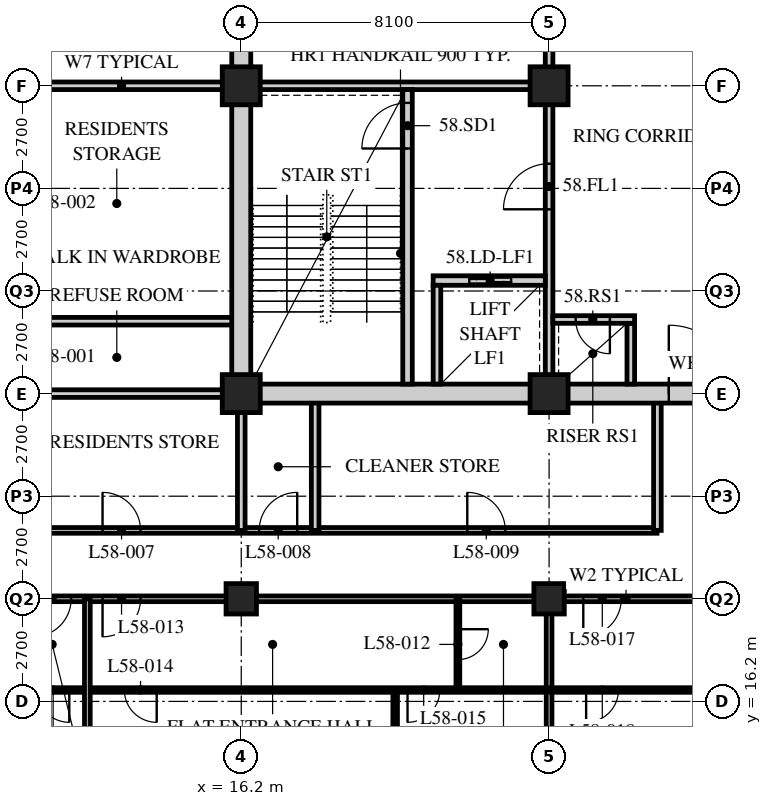
"""IFC4 building model, lengths in metres.
Left out: names, types, materials, properties, quantities, classifications, styles, units other than length and angle.
Written with IfcOpenShell. Run it as: python <this file> out.ifc"""

import sys

from ifc_helpers import new_model, si_unit, direction, frame, frame_2d, origin, origin_2d, place, context, subcontext, project, spatial, rectangle, hollow_rectangle, extrude, element, fill, save


model = new_model("IFC4")
c1 = context("Model", 3, precision=1e-05, world=origin(), true_north=direction((0.0, 1.0)))
c2 = subcontext(c1, "Body", "Model", "MODEL_VIEW")
j1 = project(units=[si_unit("LENGTHUNIT", "METRE"), si_unit("PLANEANGLEUNIT", "RADIAN")], contexts=[c1])
p1 = place(None, origin())
s1 = spatial("IfcSite", under=j1, at=p1, CompositionType="ELEMENT")
p2 = place(p1, origin())
s2 = spatial("IfcBuilding", under=s1, at=p2, CompositionType="ELEMENT")
p3 = place(p2, frame((0.0, 0.0, 224.4)))
s3 = spatial("IfcBuildingStorey", under=s2, at=p3, CompositionType="ELEMENT", Elevation=224.4)
p4 = place(p3, frame((16.2, 18.9, 0.0), z_axis=(0.0, 0.0, 1.0), x_axis=(1.0, 0.0, 0.0)))
e1 = element("IfcColumn", 1, at=p4, inside=s3, PredefinedType="COLUMN", context=c2, shape_type="SweptSolid", body=[
    extrude(hollow_rectangle(XDim=0.8, YDim=0.8, WallThickness=0.08, at=origin_2d()), origin(), (0.0, 0.0, 1.0), 3.6),
])
for number, where, z_axis, x_axis in (
    (2, (16.2, 24.3, 0.0), (0.0, 0.0, 1.0), (1.0, 0.0, 0.0)),
    (3, (16.2, 32.4, 0.0), (0.0, 0.0, 1.0), (1.0, 0.0, 0.0)),
):
    element("IfcColumn", number, at=place(p3, frame(where, z_axis=z_axis, x_axis=x_axis)), inside=s3, PredefinedType="COLUMN", context=c2, shape_type="SweptSolid", body=[
        extrude(hollow_rectangle(XDim=1.0, YDim=1.0, WallThickness=0.1, at=origin_2d()), origin(), (0.0, 0.0, 1.0), 3.6),
    ])
p5 = place(p3, frame((24.3, 18.9, 0.0), z_axis=(0.0, 0.0, 1.0), x_axis=(1.0, 0.0, 0.0)))
e4 = element("IfcColumn", 4, at=p5, inside=s3, PredefinedType="COLUMN", context=c2, shape_type="SweptSolid", body=[
    extrude(hollow_rectangle(XDim=0.8, YDim=0.8, WallThickness=0.08, at=origin_2d()), origin(), (0.0, 0.0, 1.0), 3.6),
])
for number, where, z_axis, x_axis in (
    (5, (24.3, 24.3, 0.0), (0.0, 0.0, 1.0), (1.0, 0.0, 0.0)),
    (6, (24.3, 32.4, 0.0), (0.0, 0.0, 1.0), (1.0, 0.0, 0.0)),
):
    element("IfcColumn", number, at=place(p3, frame(where, z_axis=z_axis, x_axis=x_axis)), inside=s3, PredefinedType="COLUMN", context=c2, shape_type="SweptSolid", body=[
        extrude(hollow_rectangle(XDim=1.0, YDim=1.0, WallThickness=0.1, at=origin_2d()), origin(), (0.0, 0.0, 1.0), 3.6),
    ])
p6 = place(p3, frame((8.1, 18.9, 0.0), z_axis=(0.0, 0.0, 1.0), x_axis=(1.0, 0.0, 0.0)))
e7 = element("IfcWall", 7, at=p6, inside=s3, PredefinedType="PARTITIONING", context=c2, shape_type="SweptSolid", body=[
    extrude(rectangle(XDim=36.45, YDim=0.15, at=frame_2d((18.225, 0.0))), origin(), (0.0, 0.0, 1.0), 2.628),
])
p7 = place(p6, frame((4.45, 0.0, 0.0)))
e8 = element("IfcOpeningElement", 8, at=p7, cuts=e7, PredefinedType="OPENING", context=c2, shape_type="SweptSolid", body=[
    extrude(rectangle(XDim=1.0, YDim=2.1, at=frame_2d((0.5, 1.05))), frame((0.0, 0.085, 0.0), z_axis=(0.0, -1.0, 0.0), x_axis=(1.0, 0.0, 0.0)), (0.0, 0.0, 1.0), 0.17),
])
p8 = place(p6, frame((17.1, 0.0, 0.0)))
e9 = element("IfcOpeningElement", 9, at=p8, cuts=e7, PredefinedType="OPENING", context=c2, shape_type="SweptSolid", body=[
    extrude(rectangle(XDim=1.0, YDim=2.1, at=frame_2d((0.5, 1.05))), frame((0.0, 0.085, 0.0), z_axis=(0.0, -1.0, 0.0), x_axis=(1.0, 0.0, 0.0)), (0.0, 0.0, 1.0), 0.17),
])
p9 = place(p6, frame((29.05, 0.0, 0.0)))
e10 = element("IfcOpeningElement", 10, at=p9, cuts=e7, PredefinedType="OPENING", context=c2, shape_type="SweptSolid", body=[
    extrude(rectangle(XDim=1.0, YDim=2.1, at=frame_2d((0.5, 1.05))), frame((0.0, 0.085, 0.0), z_axis=(0.0, -1.0, 0.0), x_axis=(1.0, 0.0, 0.0)), (0.0, 0.0, 1.0), 0.17),
])
p10 = place(p6, frame((2.625, 0.0, 0.0)))
e11 = element("IfcOpeningElement", 11, at=p10, cuts=e7, PredefinedType="OPENING", context=c2, shape_type="SweptSolid", body=[
    extrude(rectangle(XDim=1.0, YDim=2.1, at=frame_2d((0.5, 1.05))), frame((0.0, 0.085, 0.0), z_axis=(0.0, -1.0, 0.0), x_axis=(1.0, 0.0, 0.0)), (0.0, 0.0, 1.0), 0.17),
])
p11 = place(p6, frame((33.925, 0.0, 0.0)))
e12 = element("IfcOpeningElement", 12, at=p11, cuts=e7, PredefinedType="OPENING", context=c2, shape_type="SweptSolid", body=[
    extrude(rectangle(XDim=1.0, YDim=2.1, at=frame_2d((0.5, 1.05))), frame((0.0, 0.085, 0.0), z_axis=(0.0, -1.0, 0.0), x_axis=(1.0, 0.0, 0.0)), (0.0, 0.0, 1.0), 0.17),
])
p12 = place(p3, frame((9.9, 20.7, 0.0), z_axis=(0.0, 0.0, 1.0), x_axis=(1.0, 0.0, 0.0)))
e13 = element("IfcWall", 13, at=p12, inside=s3, PredefinedType="PARTITIONING", context=c2, shape_type="SweptSolid", body=[
    extrude(rectangle(XDim=17.24, YDim=0.15, at=frame_2d((8.62, 0.0))), origin(), (0.0, 0.0, 1.0), 3.39),
])
p13 = place(p12, frame((2.65, 0.0, 0.0)))
e14 = element("IfcOpeningElement", 14, at=p13, cuts=e13, PredefinedType="OPENING", context=c2, shape_type="SweptSolid", body=[
    extrude(rectangle(XDim=1.0, YDim=2.1, at=frame_2d((0.5, 1.05))), frame((0.0, 0.085, 0.0), z_axis=(0.0, -1.0, 0.0), x_axis=(1.0, 0.0, 0.0)), (0.0, 0.0, 1.0), 0.17),
])
p14 = place(p12, frame((6.772, 0.0, 0.0)))
e15 = element("IfcOpeningElement", 15, at=p14, cuts=e13, PredefinedType="OPENING", context=c2, shape_type="SweptSolid", body=[
    extrude(rectangle(XDim=1.0, YDim=2.1, at=frame_2d((0.5, 1.05))), frame((0.0, 0.085, 0.0), z_axis=(0.0, -1.0, 0.0), x_axis=(1.0, 0.0, 0.0)), (0.0, 0.0, 1.0), 0.17),
])
p15 = place(p12, frame((12.247, 0.0, 0.0)))
e16 = element("IfcOpeningElement", 16, at=p15, cuts=e13, PredefinedType="OPENING", context=c2, shape_type="SweptSolid", body=[
    extrude(rectangle(XDim=1.0, YDim=2.1, at=frame_2d((0.5, 1.05))), frame((0.0, 0.085, 0.0), z_axis=(0.0, -1.0, 0.0), x_axis=(1.0, 0.0, 0.0)), (0.0, 0.0, 1.0), 0.17),
])
for number, where, z_axis, x_axis in (
    (17, (9.9, 32.4, 0.0), (0.0, 0.0, 1.0), (1.0, 0.0, 0.0)),
    (18, (9.9, 26.205, 0.0), (0.0, 0.0, 1.0), (1.0, 0.0, 0.0)),
):
    element("IfcWall", number, at=place(p3, frame(where, z_axis=z_axis, x_axis=x_axis)), inside=s3, PredefinedType="SOLIDWALL", context=c2, shape_type="SweptSolid", body=[
        extrude(rectangle(XDim=6.3, YDim=0.2, at=frame_2d((3.15, 0.0))), origin(), (0.0, 0.0, 1.0), 3.39),
    ])
p16 = place(p3, frame((16.2, 20.7, 0.0), z_axis=(0.0, 0.0, 1.0), x_axis=(0.0, 1.0, 0.0)))
e19 = element("IfcWall", 19, at=p16, inside=s3, PredefinedType="SOLIDWALL", context=c2, shape_type="SweptSolid", body=[
    extrude(rectangle(XDim=3.6, YDim=0.2, at=frame_2d((1.8, 0.0))), origin(), (0.0, 0.0, 1.0), 2.628),
])
for number, where, z_axis, x_axis in (
    (20, (18.144, 20.7, 0.0), (0.0, 0.0, 1.0), (0.0, 1.0, 0.0)),
    (21, (27.15, 20.7, 0.0), (0.0, 0.0, 1.0), (0.0, 1.0, 0.0)),
):
    element("IfcWall", number, at=place(p3, frame(where, z_axis=z_axis, x_axis=x_axis)), inside=s3, PredefinedType="SOLIDWALL", context=c2, shape_type="SweptSolid", body=[
        extrude(rectangle(XDim=3.6, YDim=0.2, at=frame_2d((1.8, 0.0))), origin(), (0.0, 0.0, 1.0), 3.39),
    ])
p17 = place(p3, frame((9.9, 24.3, 0.0), z_axis=(0.0, 0.0, 1.0), x_axis=(1.0, 0.0, 0.0)))
e22 = element("IfcWall", 22, at=p17, inside=s3, PredefinedType="SOLIDWALL", context=c2, shape_type="SweptSolid", body=[
    extrude(rectangle(XDim=6.3, YDim=0.2, at=frame_2d((3.15, 0.0))), origin(), (0.0, 0.0, 1.0), 3.39),
])
p18 = place(p3, frame((21.9, 18.9, 0.0), z_axis=(0.0, 0.0, 1.0), x_axis=(0.0, -1.0, 0.0)))
e23 = element("IfcWall", 23, at=p18, inside=s3, PredefinedType="PARTITIONING", context=c2, shape_type="SweptSolid", body=[
    extrude(rectangle(XDim=2.4, YDim=0.1, at=frame_2d((1.2, 0.0))), origin(), (0.0, 0.0, 1.0), 3.39),
])
p19 = place(p18, frame((0.8, 0.0, 0.0)))
e24 = element("IfcOpeningElement", 24, at=p19, cuts=e23, PredefinedType="OPENING", context=c2, shape_type="SweptSolid", body=[
    extrude(rectangle(XDim=0.8, YDim=2.1, at=frame_2d((0.4, 1.05))), frame((0.0, 0.06, 0.0), z_axis=(0.0, -1.0, 0.0), x_axis=(1.0, 0.0, 0.0)), (0.0, 0.0, 1.0), 0.12),
])
p20 = place(p3, frame((20.25, 16.5, 0.0), z_axis=(0.0, 0.0, 1.0), x_axis=(0.0, -1.0, 0.0)))
e25 = element("IfcWall", 25, at=p20, inside=s3, PredefinedType="PARTITIONING", context=c2, shape_type="SweptSolid", body=[
    extrude(rectangle(XDim=5.4, YDim=0.12, at=frame_2d((2.7, 0.0))), origin(), (0.0, 0.0, 1.0), 3.39),
])
p21 = place(p3, frame((24.3, 18.9, 0.0), z_axis=(0.0, 0.0, 1.0), x_axis=(0.0, -1.0, 0.0)))
e26 = element("IfcWall", 26, at=p21, inside=s3, PredefinedType="PARTITIONING", context=c2, shape_type="SweptSolid", body=[
    extrude(rectangle(XDim=7.8, YDim=0.15, at=frame_2d((3.9, 0.0))), origin(), (0.0, 0.0, 1.0), 2.628),
])
p22 = place(p3, frame((8.1, 16.5, 0.0), z_axis=(0.0, 0.0, 1.0), x_axis=(1.0, 0.0, 0.0)))
e27 = element("IfcWall", 27, at=p22, inside=s3, PredefinedType="PARTITIONING", context=c2, shape_type="SweptSolid", body=[
    extrude(rectangle(XDim=28.35, YDim=0.12, at=frame_2d((14.175, 0.0))), origin(), (0.0, 0.0, 1.0), 3.39),
])
p23 = place(p22, frame((5.025, 0.0, 0.0)))
e28 = element("IfcOpeningElement", 28, at=p23, cuts=e27, PredefinedType="OPENING", context=c2, shape_type="SweptSolid", body=[
    extrude(rectangle(XDim=0.85, YDim=2.1, at=frame_2d((0.425, 1.05))), frame((0.0, 0.07, 0.0), z_axis=(0.0, -1.0, 0.0), x_axis=(1.0, 0.0, 0.0)), (0.0, 0.0, 1.0), 0.14),
])
p24 = place(p22, frame((12.475, 0.0, 0.0)))
e29 = element("IfcOpeningElement", 29, at=p24, cuts=e27, PredefinedType="OPENING", context=c2, shape_type="SweptSolid", body=[
    extrude(rectangle(XDim=0.85, YDim=2.1, at=frame_2d((0.425, 1.05))), frame((0.0, 0.07, 0.0), z_axis=(0.0, -1.0, 0.0), x_axis=(1.0, 0.0, 0.0)), (0.0, 0.0, 1.0), 0.14),
])
p25 = place(p22, frame((17.175, 0.0, 0.0)))
e30 = element("IfcOpeningElement", 30, at=p25, cuts=e27, PredefinedType="OPENING", context=c2, shape_type="SweptSolid", body=[
    extrude(rectangle(XDim=0.85, YDim=2.1, at=frame_2d((0.425, 1.05))), frame((0.0, 0.07, 0.0), z_axis=(0.0, -1.0, 0.0), x_axis=(1.0, 0.0, 0.0)), (0.0, 0.0, 1.0), 0.14),
])
p26 = place(p22, frame((24.625, 0.0, 0.0)))
e31 = element("IfcOpeningElement", 31, at=p26, cuts=e27, PredefinedType="OPENING", context=c2, shape_type="SweptSolid", body=[
    extrude(rectangle(XDim=0.85, YDim=2.1, at=frame_2d((0.425, 1.05))), frame((0.0, 0.07, 0.0), z_axis=(0.0, -1.0, 0.0), x_axis=(1.0, 0.0, 0.0)), (0.0, 0.0, 1.0), 0.14),
])
p27 = place(p22, frame((2.725, 0.0, 0.0)))
e32 = element("IfcOpeningElement", 32, at=p27, cuts=e27, PredefinedType="OPENING", context=c2, shape_type="SweptSolid", body=[
    extrude(rectangle(XDim=0.85, YDim=2.1, at=frame_2d((0.425, 1.05))), frame((0.0, 0.07, 0.0), z_axis=(0.0, -1.0, 0.0), x_axis=(1.0, 0.0, 0.0)), (0.0, 0.0, 1.0), 0.14),
])
p28 = place(p3, frame((12.15, 18.9, 0.0), z_axis=(0.0, 0.0, 1.0), x_axis=(0.0, -1.0, 0.0)))
e33 = element("IfcWall", 33, at=p28, inside=s3, PredefinedType="PARTITIONING", context=c2, shape_type="SweptSolid", body=[
    extrude(rectangle(XDim=7.8, YDim=0.15, at=frame_2d((3.9, 0.0))), origin(), (0.0, 0.0, 1.0), 3.39),
])
p29 = place(p3, frame((15.95, 24.3, 0.0), z_axis=(0.0, 0.0, 1.0), x_axis=(1.0, 0.0, 0.0)))
e34 = element("IfcWall", 34, at=p29, inside=s3, PredefinedType="SOLIDWALL", context=c2, shape_type="SweptSolid", body=[
    extrude(rectangle(XDim=24.8, YDim=0.5, at=frame_2d((12.4, 0.0))), origin(), (0.0, 0.0, 1.0), 2.628),
])
p30 = place(p29, frame((11.5, 0.0, 0.0)))
e35 = element("IfcOpeningElement", 35, at=p30, cuts=e34, PredefinedType="OPENING", context=c2, shape_type="SweptSolid", body=[
    extrude(rectangle(XDim=1.8, YDim=2.4, at=frame_2d((0.9, 1.2))), frame((0.0, 0.26, 0.0), z_axis=(0.0, -1.0, 0.0), x_axis=(1.0, 0.0, 0.0)), (0.0, 0.0, 1.0), 0.52),
])
p31 = place(p3, frame((16.2, 24.55, 0.0), z_axis=(0.0, 0.0, 1.0), x_axis=(0.0, 1.0, 0.0)))
e36 = element("IfcWall", 36, at=p31, inside=s3, PredefinedType="SOLIDWALL", context=c2, shape_type="SweptSolid", body=[
    extrude(rectangle(XDim=15.7, YDim=0.5, at=frame_2d((7.85, 0.0))), origin(), (0.0, 0.0, 1.0), 2.628),
])
p32 = place(p3, frame((16.45, 32.4, 0.0), z_axis=(0.0, 0.0, 1.0), x_axis=(1.0, 0.0, 0.0)))
e37 = element("IfcWall", 37, at=p32, inside=s3, PredefinedType="SOLIDWALL", context=c2, shape_type="SweptSolid", body=[
    extrude(rectangle(XDim=7.95, YDim=0.2, at=frame_2d((3.975, 0.0))), origin(), (0.0, 0.0, 1.0), 2.778),
])
p33 = place(p3, frame((24.3, 24.55, 0.0), z_axis=(0.0, 0.0, 1.0), x_axis=(0.0, 1.0, 0.0)))
e38 = element("IfcWall", 38, at=p33, inside=s3, PredefinedType="SOLIDWALL", context=c2, shape_type="SweptSolid", body=[
    extrude(rectangle(XDim=7.75, YDim=0.2, at=frame_2d((3.875, 0.0))), origin(), (0.0, 0.0, 1.0), 2.778),
])
p34 = place(p33, frame((4.6, 0.0, 0.0)))
e39 = element("IfcOpeningElement", 39, at=p34, cuts=e38, PredefinedType="OPENING", context=c2, shape_type="SweptSolid", body=[
    extrude(rectangle(XDim=1.2, YDim=2.1, at=frame_2d((0.6, 1.05))), frame((0.0, 0.11, 0.0), z_axis=(0.0, -1.0, 0.0), x_axis=(1.0, 0.0, 0.0)), (0.0, 0.0, 1.0), 0.22),
])
p35 = place(p3, frame((20.575, 24.55, 0.0), z_axis=(0.0, 0.0, 1.0), x_axis=(0.0, 1.0, 0.0)))
e40 = element("IfcWall", 40, at=p35, inside=s3, PredefinedType="SOLIDWALL", context=c2, shape_type="SweptSolid", body=[
    extrude(rectangle(XDim=7.75, YDim=0.25, at=frame_2d((3.875, 0.0))), origin(), (0.0, 0.0, 1.0), 3.39),
])
p36 = place(p35, frame((6.2, 0.0, 0.0)))
e41 = element("IfcOpeningElement", 41, at=p36, cuts=e40, PredefinedType="OPENING", context=c2, shape_type="SweptSolid", body=[
    extrude(rectangle(XDim=1.2, YDim=2.1, at=frame_2d((0.6, 1.05))), frame((0.0, 0.135, 0.0), z_axis=(0.0, -1.0, 0.0), x_axis=(1.0, 0.0, 0.0)), (0.0, 0.0, 1.0), 0.27),
])
p37 = place(p3, frame((21.25, 27.275, 0.0), z_axis=(0.0, 0.0, 1.0), x_axis=(1.0, 0.0, 0.0)))
e42 = element("IfcWall", 42, at=p37, inside=s3, PredefinedType="SOLIDWALL", context=c2, shape_type="SweptSolid", body=[
    extrude(rectangle(XDim=2.95, YDim=0.25, at=frame_2d((1.475, 0.0))), origin(), (0.0, 0.0, 1.0), 3.39),
])
p38 = place(p37, frame((0.95, 0.0, 0.0)))
e43 = element("IfcOpeningElement", 43, at=p38, cuts=e42, PredefinedType="OPENING", context=c2, shape_type="SweptSolid", body=[
    extrude(rectangle(XDim=1.1, YDim=2.4, at=frame_2d((0.55, 1.2))), frame((0.0, 0.135, 0.0), z_axis=(0.0, -1.0, 0.0), x_axis=(1.0, 0.0, 0.0)), (0.0, 0.0, 1.0), 0.27),
])
p39 = place(p3, frame((21.35, 24.55, 0.0), z_axis=(0.0, 0.0, 1.0), x_axis=(0.0, 1.0, 0.0)))
e44 = element("IfcWall", 44, at=p39, inside=s3, PredefinedType="SOLIDWALL", context=c2, shape_type="SweptSolid", body=[
    extrude(rectangle(XDim=2.6, YDim=0.2, at=frame_2d((1.3, 0.0))), origin(), (0.0, 0.0, 1.0), 3.39),
])
p40 = place(p3, frame((26.45, 24.55, 0.0), z_axis=(0.0, 0.0, 1.0), x_axis=(0.0, 1.0, 0.0)))
e45 = element("IfcWall", 45, at=p40, inside=s3, PredefinedType="SOLIDWALL", context=c2, shape_type="SweptSolid", body=[
    extrude(rectangle(XDim=1.6, YDim=0.2, at=frame_2d((0.8, 0.0))), origin(), (0.0, 0.0, 1.0), 3.39),
])
p41 = place(p3, frame((24.4, 26.25, 0.0), z_axis=(0.0, 0.0, 1.0), x_axis=(1.0, 0.0, 0.0)))
e46 = element("IfcWall", 46, at=p41, inside=s3, PredefinedType="SOLIDWALL", context=c2, shape_type="SweptSolid", body=[
    extrude(rectangle(XDim=2.15, YDim=0.2, at=frame_2d((1.075, 0.0))), origin(), (0.0, 0.0, 1.0), 3.39),
])
p42 = place(p41, frame((0.6, 0.0, 0.0)))
e47 = element("IfcOpeningElement", 47, at=p42, cuts=e46, PredefinedType="OPENING", context=c2, shape_type="SweptSolid", body=[
    extrude(rectangle(XDim=0.9, YDim=2.1, at=frame_2d((0.45, 1.05))), frame((0.0, 0.11, 0.0), z_axis=(0.0, -1.0, 0.0), x_axis=(1.0, 0.0, 0.0)), (0.0, 0.0, 1.0), 0.22),
])
p43 = place(p3, frame((24.3, 32.5, 0.0), z_axis=(0.0, 0.0, 1.0), x_axis=(0.0, 1.0, 0.0)))
e48 = element("IfcWall", 48, at=p43, inside=s3, PredefinedType="PARTITIONING", context=c2, shape_type="SweptSolid", body=[
    extrude(rectangle(XDim=7.75, YDim=0.2, at=frame_2d((3.875, 0.0))), origin(), (0.0, 0.0, 1.0), 2.778),
])
p44 = place(p43, frame((2.4, 0.0, 0.0)))
e49 = element("IfcOpeningElement", 49, at=p44, cuts=e48, PredefinedType="OPENING", context=c2, shape_type="SweptSolid", body=[
    extrude(rectangle(XDim=0.9, YDim=2.1, at=frame_2d((0.45, 1.05))), frame((0.0, 0.11, 0.0), z_axis=(0.0, -1.0, 0.0), x_axis=(1.0, 0.0, 0.0)), (0.0, 0.0, 1.0), 0.22),
])
p45 = place(p43, frame((6.2, 0.0, 0.0)))
e50 = element("IfcOpeningElement", 50, at=p45, cuts=e48, PredefinedType="OPENING", context=c2, shape_type="SweptSolid", body=[
    extrude(rectangle(XDim=0.9, YDim=2.1, at=frame_2d((0.45, 1.05))), frame((0.0, 0.11, 0.0), z_axis=(0.0, -1.0, 0.0), x_axis=(1.0, 0.0, 0.0)), (0.0, 0.0, 1.0), 0.22),
])
p46 = place(p13, origin())
e51 = element("IfcDoor", 51, at=p46, inside=s3, OperationType="SINGLE_SWING_LEFT", PredefinedType="DOOR", context=c2, shape_type="SweptSolid", body=[
    extrude(rectangle(XDim=1.0, YDim=2.1, at=frame_2d((0.5, 1.05))), frame((0.0, 0.025, 0.0), z_axis=(0.0, -1.0, 0.0), x_axis=(1.0, 0.0, 0.0)), (0.0, 0.0, 1.0), 0.05),
])
fill(e14, e51)
p47 = place(p14, origin())
e52 = element("IfcDoor", 52, at=p47, inside=s3, OperationType="SINGLE_SWING_RIGHT", PredefinedType="DOOR", context=c2, shape_type="SweptSolid", body=[
    extrude(rectangle(XDim=1.0, YDim=2.1, at=frame_2d((0.5, 1.05))), frame((0.0, 0.025, 0.0), z_axis=(0.0, -1.0, 0.0), x_axis=(1.0, 0.0, 0.0)), (0.0, 0.0, 1.0), 0.05),
])
fill(e15, e52)
p48 = place(p15, origin())
e53 = element("IfcDoor", 53, at=p48, inside=s3, OperationType="SINGLE_SWING_LEFT", PredefinedType="DOOR", context=c2, shape_type="SweptSolid", body=[
    extrude(rectangle(XDim=1.0, YDim=2.1, at=frame_2d((0.5, 1.05))), frame((0.0, 0.025, 0.0), z_axis=(0.0, -1.0, 0.0), x_axis=(1.0, 0.0, 0.0)), (0.0, 0.0, 1.0), 0.05),
])
fill(e16, e53)
p49 = place(p19, origin())
e54 = element("IfcDoor", 54, at=p49, inside=s3, OperationType="SINGLE_SWING_LEFT", PredefinedType="DOOR", context=c2, shape_type="SweptSolid", body=[
    extrude(rectangle(XDim=0.8, YDim=2.1, at=frame_2d((0.4, 1.05))), frame((0.0, 0.025, 0.0), z_axis=(0.0, -1.0, 0.0), x_axis=(1.0, 0.0, 0.0)), (0.0, 0.0, 1.0), 0.05),
])
fill(e24, e54)
p50 = place(p7, origin())
e55 = element("IfcDoor", 55, at=p50, inside=s3, OperationType="SINGLE_SWING_RIGHT", PredefinedType="DOOR", context=c2, shape_type="SweptSolid", body=[
    extrude(rectangle(XDim=1.0, YDim=2.1, at=frame_2d((0.5, 1.05))), frame((0.0, 0.025, 0.0), z_axis=(0.0, -1.0, 0.0), x_axis=(1.0, 0.0, 0.0)), (0.0, 0.0, 1.0), 0.05),
])
fill(e8, e55)
p51 = place(p23, origin())
e56 = element("IfcDoor", 56, at=p51, inside=s3, OperationType="SINGLE_SWING_LEFT", PredefinedType="DOOR", context=c2, shape_type="SweptSolid", body=[
    extrude(rectangle(XDim=0.85, YDim=2.1, at=frame_2d((0.425, 1.05))), frame((0.0, 0.025, 0.0), z_axis=(0.0, -1.0, 0.0), x_axis=(1.0, 0.0, 0.0)), (0.0, 0.0, 1.0), 0.05),
])
fill(e28, e56)
p52 = place(p24, origin())
e57 = element("IfcDoor", 57, at=p52, inside=s3, OperationType="SINGLE_SWING_RIGHT", PredefinedType="DOOR", context=c2, shape_type="SweptSolid", body=[
    extrude(rectangle(XDim=0.85, YDim=2.1, at=frame_2d((0.425, 1.05))), frame((0.0, 0.025, 0.0), z_axis=(0.0, -1.0, 0.0), x_axis=(1.0, 0.0, 0.0)), (0.0, 0.0, 1.0), 0.05),
])
fill(e29, e57)
p53 = place(p8, origin())
e58 = element("IfcDoor", 58, at=p53, inside=s3, OperationType="SINGLE_SWING_RIGHT", PredefinedType="DOOR", context=c2, shape_type="SweptSolid", body=[
    extrude(rectangle(XDim=1.0, YDim=2.1, at=frame_2d((0.5, 1.05))), frame((0.0, 0.025, 0.0), z_axis=(0.0, -1.0, 0.0), x_axis=(1.0, 0.0, 0.0)), (0.0, 0.0, 1.0), 0.05),
])
fill(e9, e58)
p54 = place(p25, origin())
e59 = element("IfcDoor", 59, at=p54, inside=s3, OperationType="SINGLE_SWING_RIGHT", PredefinedType="DOOR", context=c2, shape_type="SweptSolid", body=[
    extrude(rectangle(XDim=0.85, YDim=2.1, at=frame_2d((0.425, 1.05))), frame((0.0, 0.025, 0.0), z_axis=(0.0, -1.0, 0.0), x_axis=(1.0, 0.0, 0.0)), (0.0, 0.0, 1.0), 0.05),
])
fill(e30, e59)
p55 = place(p10, origin())
e60 = element("IfcDoor", 60, at=p55, inside=s3, OperationType="SINGLE_SWING_RIGHT", PredefinedType="DOOR", context=c2, shape_type="SweptSolid", body=[
    extrude(rectangle(XDim=1.0, YDim=2.1, at=frame_2d((0.5, 1.05))), frame((0.0, 0.025, 0.0), z_axis=(0.0, -1.0, 0.0), x_axis=(1.0, 0.0, 0.0)), (0.0, 0.0, 1.0), 0.05),
])
fill(e11, e60)
p56 = place(p27, origin())
e61 = element("IfcDoor", 61, at=p56, inside=s3, OperationType="SINGLE_SWING_LEFT", PredefinedType="DOOR", context=c2, shape_type="SweptSolid", body=[
    extrude(rectangle(XDim=0.85, YDim=2.1, at=frame_2d((0.425, 1.05))), frame((0.0, 0.025, 0.0), z_axis=(0.0, -1.0, 0.0), x_axis=(1.0, 0.0, 0.0)), (0.0, 0.0, 1.0), 0.05),
])
fill(e32, e61)
p57 = place(p36, origin())
e62 = element("IfcDoor", 62, at=p57, inside=s3, OperationType="SINGLE_SWING_LEFT", PredefinedType="DOOR", context=c2, shape_type="SweptSolid", body=[
    extrude(rectangle(XDim=1.2, YDim=2.1, at=frame_2d((0.6, 1.05))), frame((0.0, 0.025, 0.0), z_axis=(0.0, -1.0, 0.0), x_axis=(1.0, 0.0, 0.0)), (0.0, 0.0, 1.0), 0.05),
])
fill(e41, e62)
p58 = place(p34, origin())
e63 = element("IfcDoor", 63, at=p58, inside=s3, OperationType="SINGLE_SWING_LEFT", PredefinedType="DOOR", context=c2, shape_type="SweptSolid", body=[
    extrude(rectangle(XDim=1.2, YDim=2.1, at=frame_2d((0.6, 1.05))), frame((0.0, 0.025, 0.0), z_axis=(0.0, -1.0, 0.0), x_axis=(1.0, 0.0, 0.0)), (0.0, 0.0, 1.0), 0.05),
])
fill(e39, e63)
p59 = place(p42, origin())
e64 = element("IfcDoor", 64, at=p59, inside=s3, OperationType="SINGLE_SWING_LEFT", PredefinedType="DOOR", context=c2, shape_type="SweptSolid", body=[
    extrude(rectangle(XDim=0.9, YDim=2.1, at=frame_2d((0.45, 1.05))), frame((0.0, 0.025, 0.0), z_axis=(0.0, -1.0, 0.0), x_axis=(1.0, 0.0, 0.0)), (0.0, 0.0, 1.0), 0.05),
])
fill(e47, e64)
p60 = place(p38, origin())
e65 = element("IfcDoor", 65, at=p60, inside=s3, OperationType="DOUBLE_DOOR_SLIDING", PredefinedType="DOOR", context=c2, shape_type="SweptSolid", body=[
    extrude(rectangle(XDim=1.1, YDim=2.4, at=frame_2d((0.55, 1.2))), frame((0.0, 0.025, 0.0), z_axis=(0.0, -1.0, 0.0), x_axis=(1.0, 0.0, 0.0)), (0.0, 0.0, 1.0), 0.05),
])
fill(e43, e65)
p61 = place(p30, origin())
e66 = element("IfcDoor", 66, at=p61, inside=s3, OperationType="DOUBLE_DOOR_SINGLE_SWING", PredefinedType="DOOR", context=c2, shape_type="SweptSolid", body=[
    extrude(rectangle(XDim=1.8, YDim=2.4, at=frame_2d((0.9, 1.2))), frame((0.0, 0.025, 0.0), z_axis=(0.0, -1.0, 0.0), x_axis=(1.0, 0.0, 0.0)), (0.0, 0.0, 1.0), 0.05),
])
fill(e35, e66)
save(model, sys.argv[1])
